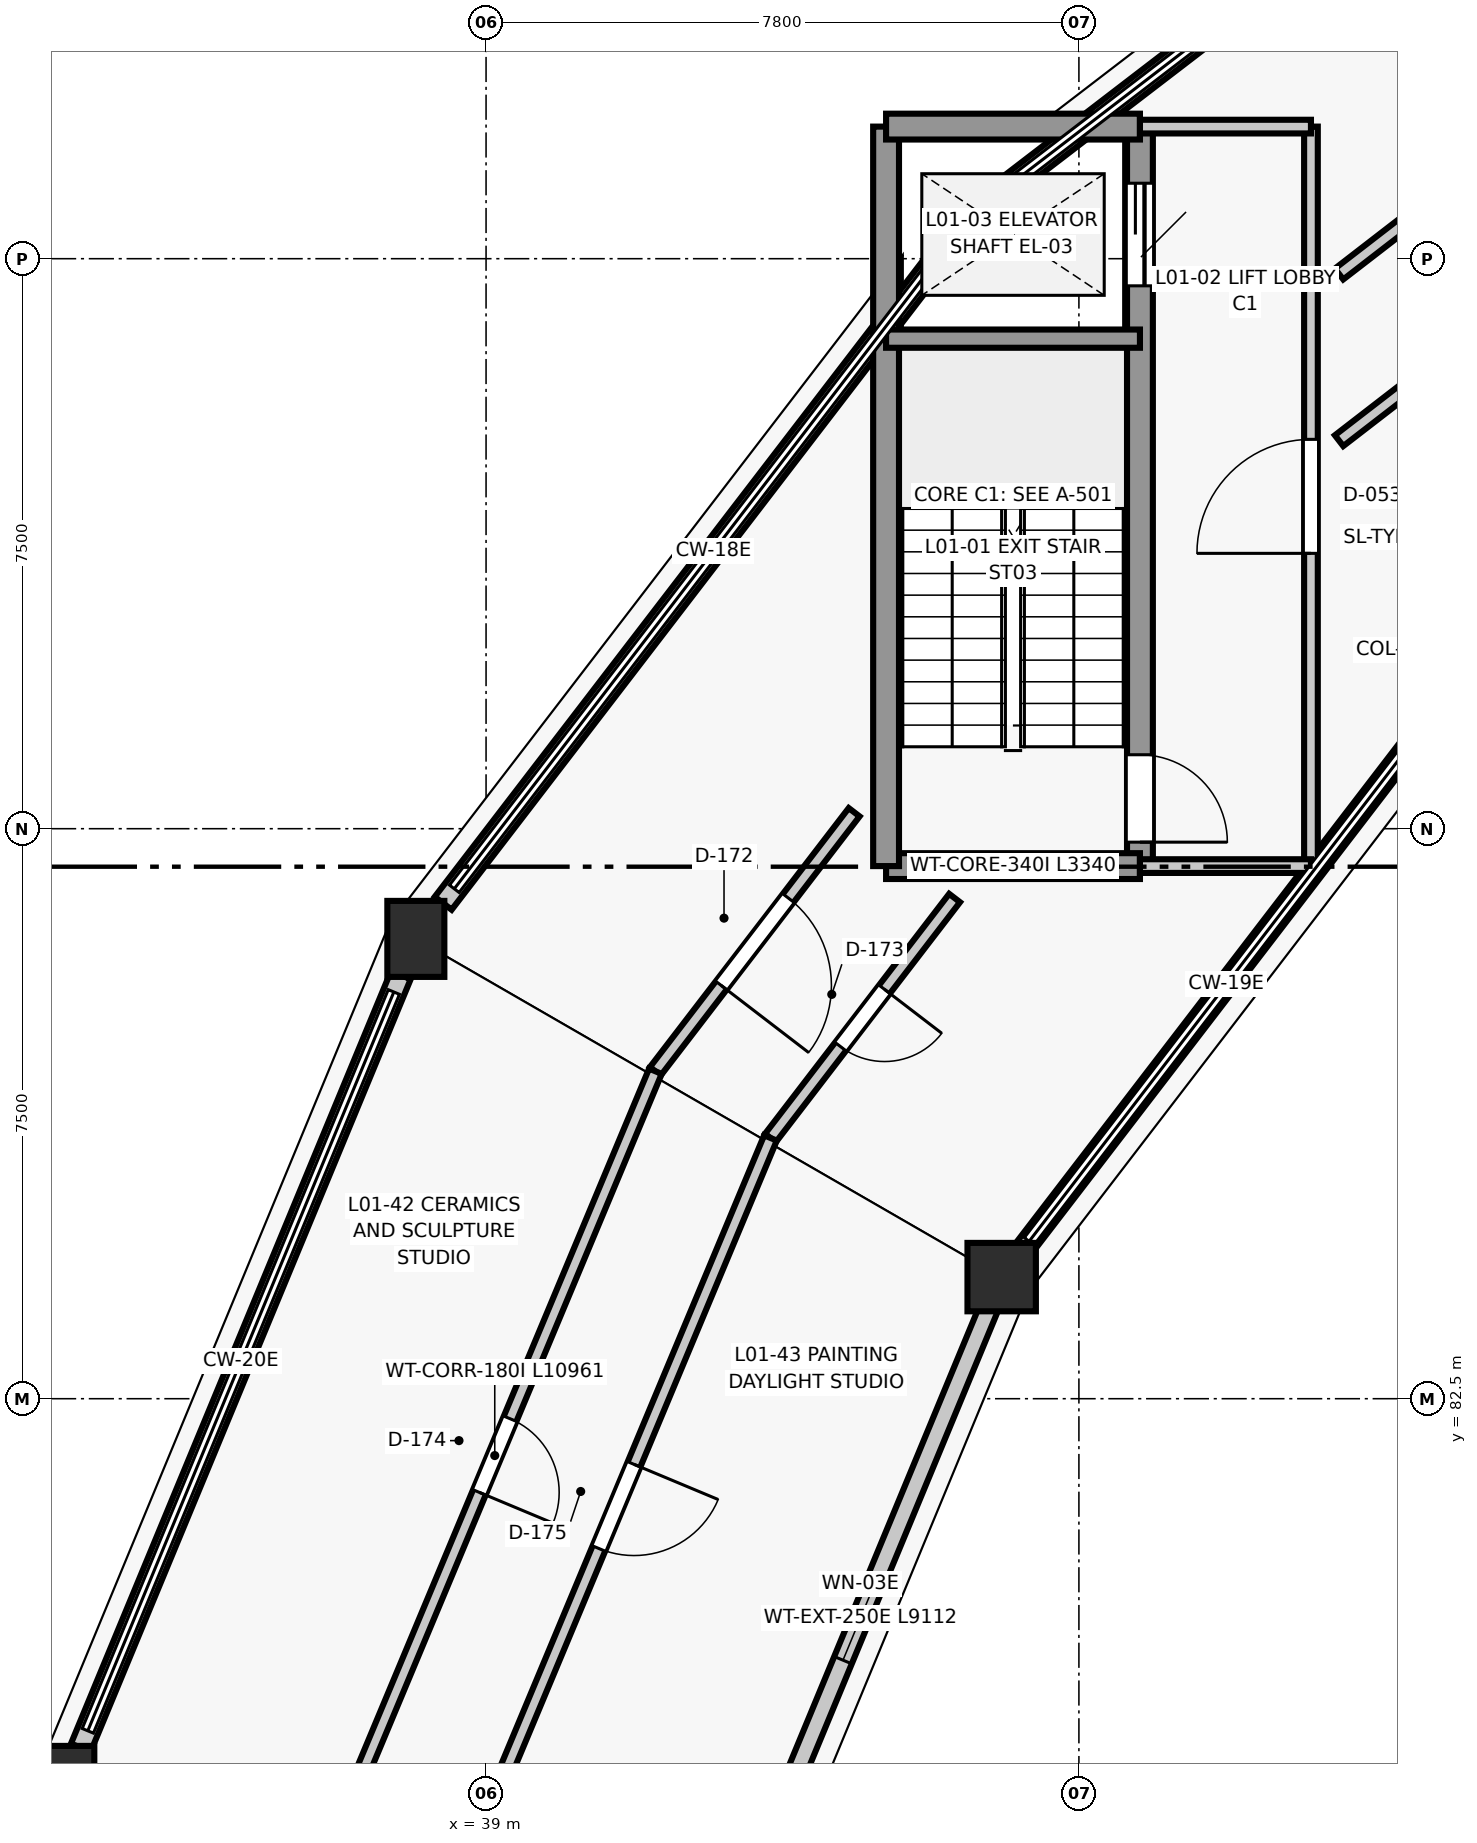
"""IFC4 building model, lengths in metres.
Left out: names, types, materials, properties, quantities, classifications, styles, units other than length and angle.
Written with IfcOpenShell. Run it as: python <this file> out.ifc"""

import sys

from ifc_helpers import new_model, si_unit, direction, frame, frame_2d, origin, origin_2d, place, context, subcontext, project, spatial, rectangle, circle, extrude, element, fill, save


model = new_model("IFC4")
c1 = context("Model", 3, precision=1e-05, world=origin(), true_north=direction((0.0, 1.0)))
c2 = subcontext(c1, "Body", "Model", "MODEL_VIEW")
j1 = project(units=[si_unit("LENGTHUNIT", "METRE"), si_unit("PLANEANGLEUNIT", "RADIAN")], contexts=[c1])
p1 = place(None, origin())
s1 = spatial("IfcSite", under=j1, at=p1, CompositionType="ELEMENT")
p2 = place(p1, origin())
s2 = spatial("IfcBuilding", under=s1, at=p2, CompositionType="ELEMENT")
p3 = place(p2, frame((0.0, 0.0, 4.5)))
s3 = spatial("IfcBuildingStorey", under=s2, at=p3, CompositionType="ELEMENT", Elevation=4.5)
p4 = place(p3, frame((45.784, 84.1, 0.0), z_axis=(0.0, 0.0, 1.0), x_axis=(1.0, 0.0, 0.0)))
e1 = element("IfcColumn", 1, at=p4, inside=s3, PredefinedType="COLUMN", context=c2, shape_type="SweptSolid", body=[
    extrude(circle(Radius=0.45, at=origin_2d()), origin(), (0.0, 0.0, 1.0), 4.2),
])
for number, where, z_axis, x_axis in (
    (2, (38.076, 88.55, 0.0), (0.0, 0.0, 1.0), (1.0, 0.0, 0.0)),
    (3, (33.471, 77.432, 0.0), (0.0, 0.0, 1.0), (1.0, 0.0, 0.0)),
):
    element("IfcColumn", number, at=place(p3, frame(where, z_axis=z_axis, x_axis=x_axis)), inside=s3, PredefinedType="COLUMN", context=c2, shape_type="SweptSolid", body=[
        extrude(rectangle(XDim=0.75, YDim=1.0, at=origin_2d()), origin(), (0.0, 0.0, 1.0), 4.2),
    ])
p5 = place(p3, frame((45.402, 98.098, 0.0), z_axis=(0.0, 0.0, 1.0), x_axis=(0.793347191248, 0.608769442514, 0.0)))
e4 = element("IfcWall", 4, at=p5, inside=s3, PredefinedType="STANDARD", context=c2, shape_type="SweptSolid", body=[
    extrude(rectangle(XDim=11.587, YDim=0.28, at=frame_2d((5.793, 0.0))), origin(), (0.0, 0.0, 1.0), 0.82),
])
p6 = place(p3, frame((38.436, 89.019, 0.0), z_axis=(0.0, 0.0, 1.0), x_axis=(0.608753523874, 0.793359406052, 0.0)))
e5 = element("IfcWall", 5, at=p6, inside=s3, PredefinedType="STANDARD", context=c2, shape_type="SweptSolid", body=[
    extrude(rectangle(XDim=11.444, YDim=0.28, at=frame_2d((5.722, 0.0))), origin(), (0.0, 0.0, 1.0), 0.82),
])
p7 = place(p3, frame((51.481, 91.524, 0.0), z_axis=(0.0, 0.0, 1.0), x_axis=(-0.608769580289, -0.793347085527, 0.0)))
e6 = element("IfcWall", 6, at=p7, inside=s3, PredefinedType="STANDARD", context=c2, shape_type="SweptSolid", body=[
    extrude(rectangle(XDim=9.005, YDim=0.25, at=frame_2d((4.502, 0.0))), origin(), (0.0, 0.0, 1.0), 0.82),
])
p8 = place(p3, frame((33.668, 77.908, 0.0), z_axis=(0.0, 0.0, 1.0), x_axis=(0.382695413149, 0.923874569817, 0.0)))
e7 = element("IfcWall", 7, at=p8, inside=s3, PredefinedType="STANDARD", context=c2, shape_type="SweptSolid", body=[
    extrude(rectangle(XDim=11.002, YDim=0.28, at=frame_2d((5.501, 0.0))), origin(), (0.0, 0.0, 1.0), 0.82),
])
p9 = place(p3, frame((45.669, 83.823, 0.0), z_axis=(0.0, 0.0, 1.0), x_axis=(-0.382681519675, -0.923880324771, 0.0)))
e8 = element("IfcWall", 8, at=p9, inside=s3, PredefinedType="STANDARD", context=c2, shape_type="SweptSolid", body=[
    extrude(rectangle(XDim=9.112, YDim=0.25, at=frame_2d((4.556, 0.0))), origin(), (0.0, 0.0, 1.0), 3.149),
])
p10 = place(p9, frame((3.956, 0.0, 0.85)))
e9 = element("IfcOpeningElement", 9, at=p10, cuts=e8, PredefinedType="OPENING", context=c2, shape_type="SweptSolid", body=[
    extrude(rectangle(XDim=1.2, YDim=1.2, at=frame_2d((0.6, 0.6))), frame((0.0, 0.135, 0.0), z_axis=(0.0, -1.0, 0.0), x_axis=(1.0, 0.0, 0.0)), (0.0, 0.0, 1.0), 0.27),
])
p11 = place(p3, frame((47.603, 99.238, 0.0), z_axis=(0.0, 0.0, 1.0), x_axis=(0.0, -1.0, 0.0)))
e10 = element("IfcWall", 10, at=p11, inside=s3, PredefinedType="SHEAR", context=c2, shape_type="SweptSolid", body=[
    extrude(rectangle(XDim=9.73, YDim=0.34, at=frame_2d((4.865, 0.0))), origin(), (0.0, 0.0, 1.0), 4.2),
])
p12 = place(p11, frame((8.265, 0.0, 0.0)))
e11 = element("IfcOpeningElement", 11, at=p12, cuts=e10, PredefinedType="OPENING", context=c2, shape_type="SweptSolid", body=[
    extrude(rectangle(XDim=1.15, YDim=2.15, at=frame_2d((0.575, 1.075))), frame((0.0, 0.18, 0.0), z_axis=(0.0, -1.0, 0.0), x_axis=(1.0, 0.0, 0.0)), (0.0, 0.0, 1.0), 0.36),
])
p13 = place(p11, frame((0.745, 0.0, 0.0)))
e12 = element("IfcOpeningElement", 12, at=p13, cuts=e10, PredefinedType="OPENING", context=c2, shape_type="SweptSolid", body=[
    extrude(rectangle(XDim=1.35, YDim=2.15, at=frame_2d((0.675, 1.075))), frame((0.0, 0.18, 0.0), z_axis=(0.0, -1.0, 0.0), x_axis=(1.0, 0.0, 0.0)), (0.0, 0.0, 1.0), 0.36),
])
p14 = place(p3, frame((47.603, 89.508, 0.0), z_axis=(0.0, 0.0, 1.0), x_axis=(-1.0, 0.0, 0.0)))
e13 = element("IfcWall", 13, at=p14, inside=s3, PredefinedType="SHEAR", context=c2, shape_type="SweptSolid", body=[
    extrude(rectangle(XDim=3.34, YDim=0.34, at=frame_2d((1.67, 0.0))), origin(), (0.0, 0.0, 1.0), 4.2),
])
p15 = place(p3, frame((44.263, 89.508, 0.0), z_axis=(0.0, 0.0, 1.0), x_axis=(0.0, 1.0, 0.0)))
e14 = element("IfcWall", 14, at=p15, inside=s3, PredefinedType="SHEAR", context=c2, shape_type="SweptSolid", body=[
    extrude(rectangle(XDim=9.73, YDim=0.34, at=frame_2d((4.865, 0.0))), origin(), (0.0, 0.0, 1.0), 4.2),
])
p16 = place(p3, frame((44.263, 99.238, 0.0), z_axis=(0.0, 0.0, 1.0), x_axis=(1.0, 0.0, 0.0)))
e15 = element("IfcWall", 15, at=p16, inside=s3, PredefinedType="SHEAR", context=c2, shape_type="SweptSolid", body=[
    extrude(rectangle(XDim=3.34, YDim=0.34, at=frame_2d((1.67, 0.0))), origin(), (0.0, 0.0, 1.0), 4.2),
])
p17 = place(p3, frame((47.603, 96.448, 0.0), z_axis=(0.0, 0.0, 1.0), x_axis=(-1.0, 0.0, 0.0)))
e16 = element("IfcWall", 16, at=p17, inside=s3, PredefinedType="SHEAR", context=c2, shape_type="SweptSolid", body=[
    extrude(rectangle(XDim=3.34, YDim=0.24, at=frame_2d((1.67, 0.0))), origin(), (0.0, 0.0, 1.0), 4.2),
])
p18 = place(p3, frame((49.853, 89.508, 0.0), z_axis=(0.0, 0.0, 1.0), x_axis=(0.0, 1.0, 0.0)))
e17 = element("IfcWall", 17, at=p18, inside=s3, PredefinedType="PARTITIONING", context=c2, shape_type="SweptSolid", body=[
    extrude(rectangle(XDim=9.73, YDim=0.18, at=frame_2d((4.865, 0.0))), origin(), (0.0, 0.0, 1.0), 3.855),
])
p19 = place(p18, frame((4.115, 0.0, 0.0)))
e18 = element("IfcOpeningElement", 18, at=p19, cuts=e17, PredefinedType="OPENING", context=c2, shape_type="SweptSolid", body=[
    extrude(rectangle(XDim=1.5, YDim=2.15, at=frame_2d((0.75, 1.075))), frame((0.0, 0.1, 0.0), z_axis=(0.0, -1.0, 0.0), x_axis=(1.0, 0.0, 0.0)), (0.0, 0.0, 1.0), 0.2),
])
for number, where, z_axis, x_axis in (
    (19, (47.603, 89.508, 0.0), (0.0, 0.0, 1.0), (1.0, 0.0, 0.0)),
    (20, (47.603, 99.238, 0.0), (0.0, 0.0, 1.0), (1.0, 0.0, 0.0)),
):
    element("IfcWall", number, at=place(p3, frame(where, z_axis=z_axis, x_axis=x_axis)), inside=s3, PredefinedType="PARTITIONING", context=c2, shape_type="SweptSolid", body=[
        extrude(rectangle(XDim=2.25, YDim=0.18, at=frame_2d((1.125, 0.0))), origin(), (0.0, 0.0, 1.0), 3.855),
    ])
p20 = place(p3, frame((56.575, 102.205, 0.0), z_axis=(0.0, 0.0, 1.0), x_axis=(-0.791414761664, -0.61127953918, 0.0)))
e21 = element("IfcWall", 21, at=p20, inside=s3, PredefinedType="PARTITIONING", context=c2, shape_type="SweptSolid", body=[
    extrude(rectangle(XDim=8.026, YDim=0.18, at=frame_2d((4.013, 0.0))), origin(), (0.0, 0.0, 1.0), 3.855),
])
p21 = place(p20, frame((3.413, 0.0, 0.0)))
e22 = element("IfcOpeningElement", 22, at=p21, cuts=e21, PredefinedType="OPENING", context=c2, shape_type="SweptSolid", body=[
    extrude(rectangle(XDim=1.2, YDim=2.15, at=frame_2d((0.6, 1.075))), frame((0.0, 0.1, 0.0), z_axis=(0.0, -1.0, 0.0), x_axis=(1.0, 0.0, 0.0)), (0.0, 0.0, 1.0), 0.2),
])
p22 = place(p3, frame((57.457, 100.693, 0.0), z_axis=(0.0, 0.0, 1.0), x_axis=(-0.79142007835, -0.611272655683, 0.0)))
e23 = element("IfcWall", 23, at=p22, inside=s3, PredefinedType="PARTITIONING", context=c2, shape_type="SweptSolid", body=[
    extrude(rectangle(XDim=9.141, YDim=0.18, at=frame_2d((4.571, 0.0))), origin(), (0.0, 0.0, 1.0), 3.855),
])
p23 = place(p22, frame((3.82, 0.0, 0.0)))
e24 = element("IfcOpeningElement", 24, at=p23, cuts=e23, PredefinedType="OPENING", context=c2, shape_type="SweptSolid", body=[
    extrude(rectangle(XDim=1.5, YDim=2.15, at=frame_2d((0.75, 1.075))), frame((0.0, 0.1, 0.0), z_axis=(0.0, -1.0, 0.0), x_axis=(1.0, 0.0, 0.0)), (0.0, 0.0, 1.0), 0.2),
])
p24 = place(p3, frame((43.843, 90.217, 0.0), z_axis=(0.0, 0.0, 1.0), x_axis=(-0.608738105254, -0.793371236693, 0.0)))
e25 = element("IfcWall", 25, at=p24, inside=s3, PredefinedType="PARTITIONING", context=c2, shape_type="SweptSolid", body=[
    extrude(rectangle(XDim=4.296, YDim=0.18, at=frame_2d((2.148, 0.0))), origin(), (0.0, 0.0, 1.0), 3.855),
])
p25 = place(p24, frame((1.423, 0.0, 0.0)))
e26 = element("IfcOpeningElement", 26, at=p25, cuts=e25, PredefinedType="OPENING", context=c2, shape_type="SweptSolid", body=[
    extrude(rectangle(XDim=1.45, YDim=2.2, at=frame_2d((0.725, 1.1))), frame((0.0, 0.1, 0.0), z_axis=(0.0, -1.0, 0.0), x_axis=(1.0, 0.0, 0.0)), (0.0, 0.0, 1.0), 0.2),
])
p26 = place(p3, frame((45.164, 89.088, 0.0), z_axis=(0.0, 0.0, 1.0), x_axis=(-0.608788255247, -0.793332755074, 0.0)))
e27 = element("IfcWall", 27, at=p26, inside=s3, PredefinedType="PARTITIONING", context=c2, shape_type="SweptSolid", body=[
    extrude(rectangle(XDim=3.979, YDim=0.18, at=frame_2d((1.99, 0.0))), origin(), (0.0, 0.0, 1.0), 3.855),
])
p27 = place(p26, frame((1.515, 0.0, 0.0)))
e28 = element("IfcOpeningElement", 28, at=p27, cuts=e27, PredefinedType="OPENING", context=c2, shape_type="SweptSolid", body=[
    extrude(rectangle(XDim=0.95, YDim=2.1, at=frame_2d((0.475, 1.05))), frame((0.0, 0.1, 0.0), z_axis=(0.0, -1.0, 0.0), x_axis=(1.0, 0.0, 0.0)), (0.0, 0.0, 1.0), 0.2),
])
p28 = place(p3, frame((41.228, 86.808, 0.0), z_axis=(0.0, 0.0, 1.0), x_axis=(-0.385621022036, -0.922657264299, 0.0)))
e29 = element("IfcWall", 29, at=p28, inside=s3, PredefinedType="PARTITIONING", context=c2, shape_type="SweptSolid", body=[
    extrude(rectangle(XDim=10.961, YDim=0.18, at=frame_2d((5.48, 0.0))), origin(), (0.0, 0.0, 1.0), 3.855),
])
p29 = place(p28, frame((4.956, 0.0, 0.0)))
e30 = element("IfcOpeningElement", 30, at=p29, cuts=e29, PredefinedType="OPENING", context=c2, shape_type="SweptSolid", body=[
    extrude(rectangle(XDim=1.05, YDim=2.1, at=frame_2d((0.525, 1.05))), frame((0.0, 0.1, 0.0), z_axis=(0.0, -1.0, 0.0), x_axis=(1.0, 0.0, 0.0)), (0.0, 0.0, 1.0), 0.2),
])
p30 = place(p3, frame((42.742, 85.931, 0.0), z_axis=(0.0, 0.0, 1.0), x_axis=(-0.385601563936, -0.922665396495, 0.0)))
e31 = element("IfcWall", 31, at=p30, inside=s3, PredefinedType="PARTITIONING", context=c2, shape_type="SweptSolid", body=[
    extrude(rectangle(XDim=10.51, YDim=0.18, at=frame_2d((5.255, 0.0))), origin(), (0.0, 0.0, 1.0), 3.855),
])
p31 = place(p30, frame((4.655, 0.0, 0.0)))
e32 = element("IfcOpeningElement", 32, at=p31, cuts=e31, PredefinedType="OPENING", context=c2, shape_type="SweptSolid", body=[
    extrude(rectangle(XDim=1.2, YDim=2.15, at=frame_2d((0.6, 1.075))), frame((0.0, 0.1, 0.0), z_axis=(0.0, -1.0, 0.0), x_axis=(1.0, 0.0, 0.0)), (0.0, 0.0, 1.0), 0.2),
])
p32 = place(p10, origin())
e33 = element("IfcWindow", 33, at=p32, inside=s3, PartitioningType="SINGLE_PANEL", PredefinedType="WINDOW", context=c2, shape_type="SweptSolid", body=[
    extrude(rectangle(XDim=1.2, YDim=1.2, at=frame_2d((0.6, 0.6))), frame((0.0, 0.03, 0.0), z_axis=(0.0, -1.0, 0.0), x_axis=(1.0, 0.0, 0.0)), (0.0, 0.0, 1.0), 0.06),
])
fill(e9, e33)
p33 = place(p12, origin())
e34 = element("IfcDoor", 34, at=p33, inside=s3, OperationType="SINGLE_SWING_RIGHT", PredefinedType="DOOR", context=c2, shape_type="SweptSolid", body=[
    extrude(rectangle(XDim=1.15, YDim=2.15, at=frame_2d((0.575, 1.075))), frame((0.0, 0.025, 0.0), z_axis=(0.0, -1.0, 0.0), x_axis=(1.0, 0.0, 0.0)), (0.0, 0.0, 1.0), 0.05),
])
fill(e11, e34)
p34 = place(p13, origin())
e35 = element("IfcDoor", 35, at=p34, inside=s3, OperationType="SLIDING_TO_LEFT", PredefinedType="DOOR", context=c2, shape_type="SweptSolid", body=[
    extrude(rectangle(XDim=1.35, YDim=2.15, at=frame_2d((0.675, 1.075))), frame((0.0, 0.025, 0.0), z_axis=(0.0, -1.0, 0.0), x_axis=(1.0, 0.0, 0.0)), (0.0, 0.0, 1.0), 0.05),
])
fill(e12, e35)
p35 = place(p19, origin())
e36 = element("IfcDoor", 36, at=p35, inside=s3, OperationType="SINGLE_SWING_LEFT", PredefinedType="DOOR", context=c2, shape_type="SweptSolid", body=[
    extrude(rectangle(XDim=1.5, YDim=2.15, at=frame_2d((0.75, 1.075))), frame((0.0, 0.025, 0.0), z_axis=(0.0, -1.0, 0.0), x_axis=(1.0, 0.0, 0.0)), (0.0, 0.0, 1.0), 0.05),
])
fill(e18, e36)
p36 = place(p25, origin())
e37 = element("IfcDoor", 37, at=p36, inside=s3, OperationType="SINGLE_SWING_RIGHT", PredefinedType="DOOR", context=c2, shape_type="SweptSolid", body=[
    extrude(rectangle(XDim=1.45, YDim=2.2, at=frame_2d((0.725, 1.1))), frame((0.0, 0.025, 0.0), z_axis=(0.0, -1.0, 0.0), x_axis=(1.0, 0.0, 0.0)), (0.0, 0.0, 1.0), 0.05),
])
fill(e26, e37)
p37 = place(p27, origin())
e38 = element("IfcDoor", 38, at=p37, inside=s3, OperationType="SINGLE_SWING_LEFT", PredefinedType="DOOR", context=c2, shape_type="SweptSolid", body=[
    extrude(rectangle(XDim=0.95, YDim=2.1, at=frame_2d((0.475, 1.05))), frame((0.0, 0.025, 0.0), z_axis=(0.0, -1.0, 0.0), x_axis=(1.0, 0.0, 0.0)), (0.0, 0.0, 1.0), 0.05),
])
fill(e28, e38)
p38 = place(p29, origin())
e39 = element("IfcDoor", 39, at=p38, inside=s3, OperationType="SINGLE_SWING_RIGHT", PredefinedType="DOOR", context=c2, shape_type="SweptSolid", body=[
    extrude(rectangle(XDim=1.05, YDim=2.1, at=frame_2d((0.525, 1.05))), frame((0.0, 0.025, 0.0), z_axis=(0.0, -1.0, 0.0), x_axis=(1.0, 0.0, 0.0)), (0.0, 0.0, 1.0), 0.05),
])
fill(e30, e39)
p39 = place(p31, origin())
e40 = element("IfcDoor", 40, at=p39, inside=s3, OperationType="SINGLE_SWING_LEFT", PredefinedType="DOOR", context=c2, shape_type="SweptSolid", body=[
    extrude(rectangle(XDim=1.2, YDim=2.15, at=frame_2d((0.6, 1.075))), frame((0.0, 0.025, 0.0), z_axis=(0.0, -1.0, 0.0), x_axis=(1.0, 0.0, 0.0)), (0.0, 0.0, 1.0), 0.05),
])
fill(e32, e40)
save(model, sys.argv[1])
